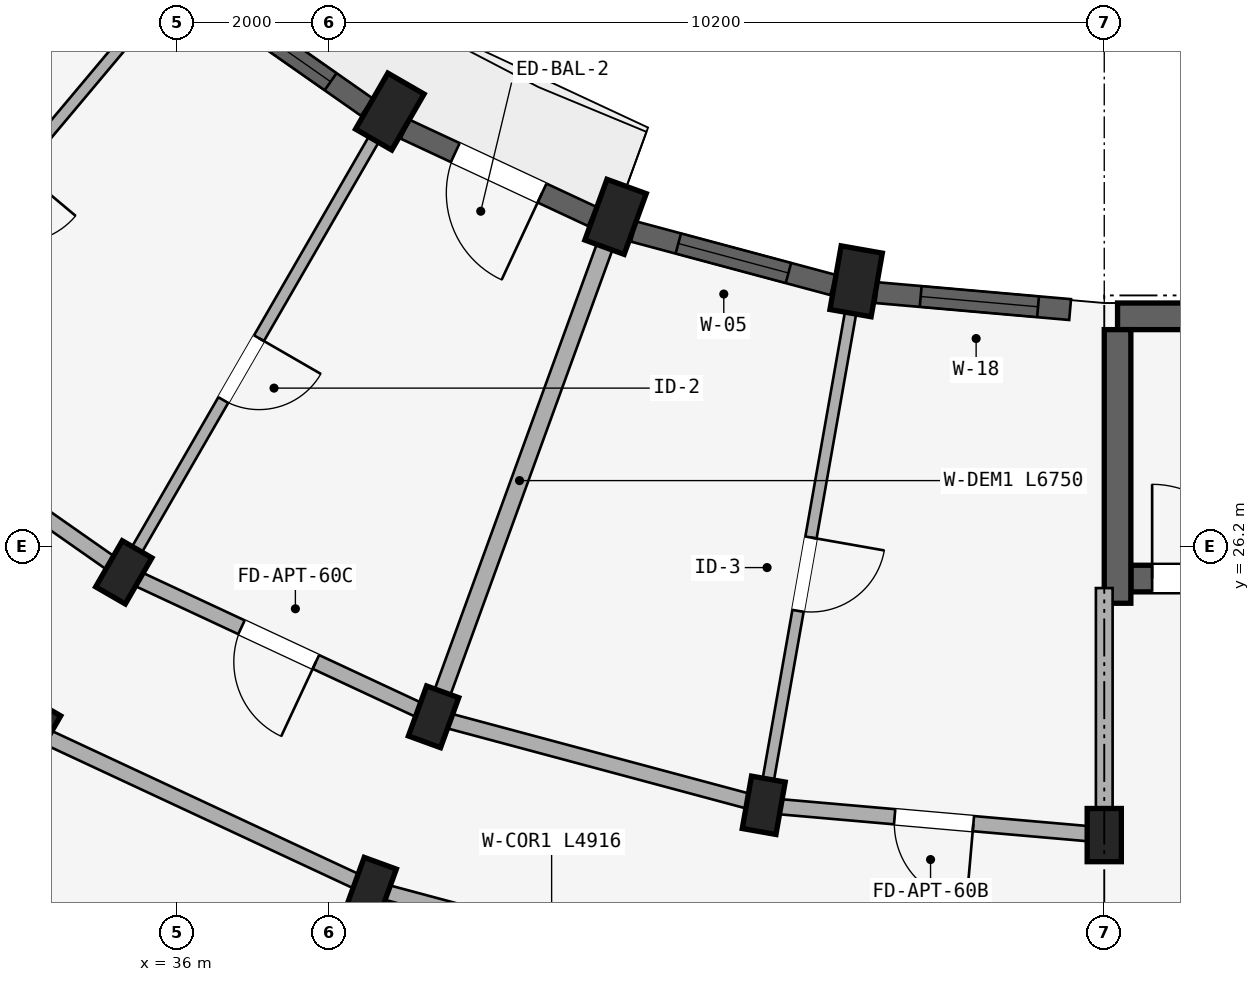
"""IFC4 building model, lengths in metres.
Left out: names, types, materials, properties, quantities, classifications, styles, units other than length and angle.
Written with IfcOpenShell. Run it as: python <this file> out.ifc"""

import sys

from ifc_helpers import new_model, si_unit, direction, frame, frame_2d, origin, origin_2d, place, context, subcontext, project, spatial, rectangle, extrude, element, fill, save


model = new_model("IFC4")
c1 = context("Model", 3, precision=1e-05, world=origin(), true_north=direction((0.0, 1.0)))
c2 = subcontext(c1, "Body", "Model", "MODEL_VIEW")
j1 = project(units=[si_unit("LENGTHUNIT", "METRE"), si_unit("PLANEANGLEUNIT", "RADIAN")], contexts=[c1])
p1 = place(None, origin())
s1 = spatial("IfcSite", under=j1, at=p1, CompositionType="ELEMENT")
p2 = place(p1, origin())
s2 = spatial("IfcBuilding", under=s1, at=p2, CompositionType="ELEMENT")
p3 = place(p2, frame((0.0, 0.0, 11.85)))
s3 = spatial("IfcBuildingStorey", under=s2, at=p3, CompositionType="ELEMENT", Elevation=11.85)
p4 = place(p3, frame((48.375, 29.225, 0.0), z_axis=(0.0, 0.0, 1.0), x_axis=(1.0, 0.0, 0.0)))
e1 = element("IfcWall", 1, at=p4, inside=s3, PredefinedType="SHEAR", context=c2, shape_type="SweptSolid", body=[
    extrude(rectangle(XDim=8.25, YDim=0.35, at=frame_2d((4.125, 0.0))), origin(), (0.0, 0.0, 1.0), 2.93),
])
p5 = place(p3, frame((48.55, 25.775, 0.0), z_axis=(0.0, 0.0, 1.0), x_axis=(1.0, 0.0, 0.0)))
e2 = element("IfcWall", 2, at=p5, inside=s3, PredefinedType="SHEAR", context=c2, shape_type="SweptSolid", body=[
    extrude(rectangle(XDim=7.9, YDim=0.35, at=frame_2d((3.95, 0.0))), origin(), (0.0, 0.0, 1.0), 2.93),
])
p6 = place(p5, frame((0.28, 0.0, 0.0)))
e3 = element("IfcOpeningElement", 3, at=p6, cuts=e2, PredefinedType="OPENING", context=c2, shape_type="SweptSolid", body=[
    extrude(rectangle(XDim=1.24, YDim=2.15, at=frame_2d((0.62, 1.075))), frame((0.0, 0.185, 0.0), z_axis=(0.0, -1.0, 0.0), x_axis=(1.0, 0.0, 0.0)), (0.0, 0.0, 1.0), 0.37),
])
p7 = place(p3, frame((48.375, 29.05, 0.0), z_axis=(0.0, 0.0, 1.0), x_axis=(0.0, -1.0, 0.0)))
e4 = element("IfcWall", 4, at=p7, inside=s3, PredefinedType="SHEAR", context=c2, shape_type="SweptSolid", body=[
    extrude(rectangle(XDim=3.6, YDim=0.35, at=frame_2d((1.8, 0.0))), origin(), (0.0, 0.0, 1.0), 2.93),
])
p8 = place(p3, frame((48.2, 22.4, 0.0), z_axis=(0.0, 0.0, 1.0), x_axis=(1.0, 0.0, 0.0)))
e5 = element("IfcColumn", 5, at=p8, inside=s3, PredefinedType="COLUMN", context=c2, shape_type="SweptSolid", body=[
    extrude(rectangle(XDim=0.45, YDim=0.7, at=origin_2d()), origin(), (0.0, 0.0, 1.0), 2.93),
])
p9 = place(p3, frame((44.935, 29.686, 0.0), z_axis=(0.0, 0.0, 1.0), x_axis=(-0.984807753012, 0.173648177667, 0.0)))
e6 = element("IfcColumn", 6, at=p9, inside=s3, PredefinedType="COLUMN", context=c2, shape_type="SweptSolid", body=[
    extrude(rectangle(XDim=0.55, YDim=0.85, at=origin_2d()), origin(), (0.0, 0.0, 1.0), 2.93),
])
p10 = place(p3, frame((43.72, 22.792, 0.0), z_axis=(0.0, 0.0, 1.0), x_axis=(-0.984807753012, 0.173648177667, 0.0)))
e7 = element("IfcColumn", 7, at=p10, inside=s3, PredefinedType="COLUMN", context=c2, shape_type="SweptSolid", body=[
    extrude(rectangle(XDim=0.45, YDim=0.7, at=origin_2d()), origin(), (0.0, 0.0, 1.0), 2.93),
])
p11 = place(p3, frame((41.77, 30.534, 0.0), z_axis=(0.0, 0.0, 1.0), x_axis=(-0.939692620786, 0.342020143326, 0.0)))
e8 = element("IfcColumn", 8, at=p11, inside=s3, PredefinedType="COLUMN", context=c2, shape_type="SweptSolid", body=[
    extrude(rectangle(XDim=0.55, YDim=0.85, at=origin_2d()), origin(), (0.0, 0.0, 1.0), 2.93),
])
for number, where, z_axis, x_axis in (
    (9, (39.376, 23.956, 0.0), (0.0, 0.0, 1.0), (-0.94, 0.342, 0.0)),
    (10, (38.555, 21.701, 0.0), (0.0, 0.0, 1.0), (-0.94, 0.342, 0.0)),
):
    element("IfcColumn", number, at=place(p3, frame(where, z_axis=z_axis, x_axis=x_axis)), inside=s3, PredefinedType="COLUMN", context=c2, shape_type="SweptSolid", body=[
        extrude(rectangle(XDim=0.45, YDim=0.7, at=origin_2d()), origin(), (0.0, 0.0, 1.0), 2.93),
    ])
p12 = place(p3, frame((38.8, 31.919, 0.0), z_axis=(0.0, 0.0, 1.0), x_axis=(-0.866025403784, 0.5, 0.0)))
e11 = element("IfcColumn", 11, at=p12, inside=s3, PredefinedType="COLUMN", context=c2, shape_type="SweptSolid", body=[
    extrude(rectangle(XDim=0.55, YDim=0.85, at=origin_2d()), origin(), (0.0, 0.0, 1.0), 2.93),
])
for number, where, z_axis, x_axis in (
    (12, (35.3, 25.856, 0.0), (0.0, 0.0, 1.0), (-0.866, 0.5, 0.0)),
    (13, (34.1, 23.778, 0.0), (0.0, 0.0, 1.0), (-0.866, 0.5, 0.0)),
):
    element("IfcColumn", number, at=place(p3, frame(where, z_axis=z_axis, x_axis=x_axis)), inside=s3, PredefinedType="COLUMN", context=c2, shape_type="SweptSolid", body=[
        extrude(rectangle(XDim=0.45, YDim=0.7, at=origin_2d()), origin(), (0.0, 0.0, 1.0), 2.93),
    ])
p13 = place(p3, frame((48.2, 22.4, 0.0), z_axis=(0.0, 0.0, 1.0), x_axis=(-0.996191949488, 0.087187153726, 0.0)))
e14 = element("IfcWall", 14, at=p13, inside=s3, PredefinedType="STANDARD", context=c2, shape_type="SweptSolid", body=[
    extrude(rectangle(XDim=4.497, YDim=0.2, at=frame_2d((2.249, 0.0))), origin(), (0.0, 0.0, 1.0), 2.372),
])
p14 = place(p13, frame((1.729, 0.0, 0.0)))
e15 = element("IfcOpeningElement", 15, at=p14, cuts=e14, PredefinedType="OPENING", context=c2, shape_type="SweptSolid", body=[
    extrude(rectangle(XDim=1.04, YDim=2.15, at=frame_2d((0.52, 1.075))), frame((0.0, 0.11, 0.0), z_axis=(0.0, -1.0, 0.0), x_axis=(1.0, 0.0, 0.0)), (0.0, 0.0, 1.0), 0.22),
])
p15 = place(p3, frame((43.72, 22.792, 0.0), z_axis=(0.0, 0.0, 1.0), x_axis=(-0.965934240054, 0.258787642463, 0.0)))
e16 = element("IfcWall", 16, at=p15, inside=s3, PredefinedType="STANDARD", context=c2, shape_type="SweptSolid", body=[
    extrude(rectangle(XDim=4.497, YDim=0.2, at=frame_2d((2.249, 0.0))), origin(), (0.0, 0.0, 1.0), 2.372),
])
p16 = place(p3, frame((43.303, 20.428, 0.0), z_axis=(0.0, 0.0, 1.0), x_axis=(-0.965930095386, 0.258803112091, 0.0)))
e17 = element("IfcWall", 17, at=p16, inside=s3, PredefinedType="STANDARD", context=c2, shape_type="SweptSolid", body=[
    extrude(rectangle(XDim=4.916, YDim=0.2, at=frame_2d((2.458, 0.0))), origin(), (0.0, 0.0, 1.0), 2.372),
])
p17 = place(p3, frame((39.376, 23.956, 0.0), z_axis=(0.0, 0.0, 1.0), x_axis=(-0.906307919131, 0.422617978463, 0.0)))
e18 = element("IfcWall", 18, at=p17, inside=s3, PredefinedType="STANDARD", context=c2, shape_type="SweptSolid", body=[
    extrude(rectangle(XDim=4.497, YDim=0.2, at=frame_2d((2.249, 0.0))), origin(), (0.0, 0.0, 1.0), 2.372),
])
p18 = place(p17, frame((1.709, 0.0, 0.0)))
e19 = element("IfcOpeningElement", 19, at=p18, cuts=e18, PredefinedType="OPENING", context=c2, shape_type="SweptSolid", body=[
    extrude(rectangle(XDim=1.08, YDim=2.15, at=frame_2d((0.54, 1.075))), frame((0.0, 0.11, 0.0), z_axis=(0.0, -1.0, 0.0), x_axis=(1.0, 0.0, 0.0)), (0.0, 0.0, 1.0), 0.22),
])
p19 = place(p3, frame((38.555, 21.701, 0.0), z_axis=(0.0, 0.0, 1.0), x_axis=(-0.906302381024, 0.422629854778, 0.0)))
e20 = element("IfcWall", 20, at=p19, inside=s3, PredefinedType="STANDARD", context=c2, shape_type="SweptSolid", body=[
    extrude(rectangle(XDim=4.915, YDim=0.2, at=frame_2d((2.458, 0.0))), origin(), (0.0, 0.0, 1.0), 2.372),
])
p20 = place(p3, frame((35.3, 25.856, 0.0), z_axis=(0.0, 0.0, 1.0), x_axis=(-0.819155404658, 0.573571637217, 0.0)))
e21 = element("IfcWall", 21, at=p20, inside=s3, PredefinedType="STANDARD", context=c2, shape_type="SweptSolid", body=[
    extrude(rectangle(XDim=4.497, YDim=0.2, at=frame_2d((2.249, 0.0))), origin(), (0.0, 0.0, 1.0), 2.372),
])
p21 = place(p3, frame((48.2, 25.65, 0.0), z_axis=(0.0, 0.0, 1.0), x_axis=(0.0, -1.0, 0.0)))
e22 = element("IfcWall", 22, at=p21, inside=s3, PredefinedType="STANDARD", context=c2, shape_type="SweptSolid", body=[
    extrude(rectangle(XDim=3.2, YDim=0.22, at=frame_2d((1.6, 0.0))), origin(), (0.0, 0.0, 1.0), 2.372),
])
p22 = place(p3, frame((44.901, 29.489, 0.0), z_axis=(0.0, 0.0, 1.0), x_axis=(-0.173647089161, -0.984807944945, 0.0)))
e23 = element("IfcWall", 23, at=p22, inside=s3, PredefinedType="PARTITIONING", context=c2, shape_type="SweptSolid", body=[
    extrude(rectangle(XDim=6.75, YDim=0.15, at=frame_2d((3.375, 0.0))), origin(), (0.0, 0.0, 1.0), 2.372),
])
p23 = place(p22, frame((3.222, 0.0, 0.0)))
e24 = element("IfcOpeningElement", 24, at=p23, cuts=e23, PredefinedType="OPENING", context=c2, shape_type="SweptSolid", body=[
    extrude(rectangle(XDim=0.98, YDim=2.12, at=frame_2d((0.49, 1.06))), frame((0.0, 0.085, 0.0), z_axis=(0.0, -1.0, 0.0), x_axis=(1.0, 0.0, 0.0)), (0.0, 0.0, 1.0), 0.17),
])
p24 = place(p3, frame((41.702, 30.346, 0.0), z_axis=(0.0, 0.0, 1.0), x_axis=(-0.342010221662, -0.939696231917, 0.0)))
e25 = element("IfcWall", 25, at=p24, inside=s3, PredefinedType="STANDARD", context=c2, shape_type="SweptSolid", body=[
    extrude(rectangle(XDim=6.75, YDim=0.22, at=frame_2d((3.375, 0.0))), origin(), (0.0, 0.0, 1.0), 2.372),
])
p25 = place(p3, frame((38.521, 21.607, 0.0), z_axis=(0.0, 0.0, 1.0), x_axis=(-0.342022120477, -0.939691901159, 0.0)))
e26 = element("IfcWall", 26, at=p25, inside=s3, PredefinedType="PARTITIONING", context=c2, shape_type="SweptSolid", body=[
    extrude(rectangle(XDim=17.42, YDim=0.15, at=frame_2d((8.71, 0.0))), origin(), (0.0, 0.0, 1.0), 2.372),
])
p26 = place(p25, frame((4.45, 0.0, 0.0)))
e27 = element("IfcOpeningElement", 27, at=p26, cuts=e26, PredefinedType="OPENING", context=c2, shape_type="SweptSolid", body=[
    extrude(rectangle(XDim=0.8, YDim=2.1, at=frame_2d((0.4, 1.05))), frame((0.0, 0.085, 0.0), z_axis=(0.0, -1.0, 0.0), x_axis=(1.0, 0.0, 0.0)), (0.0, 0.0, 1.0), 0.17),
])
p27 = place(p3, frame((38.7, 31.746, 0.0), z_axis=(0.0, 0.0, 1.0), x_axis=(-0.499997969693, -0.866026575979, 0.0)))
e28 = element("IfcWall", 28, at=p27, inside=s3, PredefinedType="PARTITIONING", context=c2, shape_type="SweptSolid", body=[
    extrude(rectangle(XDim=6.75, YDim=0.15, at=frame_2d((3.375, 0.0))), origin(), (0.0, 0.0, 1.0), 2.372),
])
p28 = place(p27, frame((3.242, 0.0, 0.0)))
e29 = element("IfcOpeningElement", 29, at=p28, cuts=e28, PredefinedType="OPENING", context=c2, shape_type="SweptSolid", body=[
    extrude(rectangle(XDim=0.94, YDim=2.1, at=frame_2d((0.47, 1.05))), frame((0.0, 0.085, 0.0), z_axis=(0.0, -1.0, 0.0), x_axis=(1.0, 0.0, 0.0)), (0.0, 0.0, 1.0), 0.17),
])
p29 = place(p3, frame((35.987, 33.645, 0.0), z_axis=(0.0, 0.0, 1.0), x_axis=(-0.642784846501, -0.766046761698, 0.0)))
e30 = element("IfcWall", 30, at=p29, inside=s3, PredefinedType="PARTITIONING", context=c2, shape_type="SweptSolid", body=[
    extrude(rectangle(XDim=6.75, YDim=0.15, at=frame_2d((3.375, 0.0))), origin(), (0.0, 0.0, 1.0), 2.372),
])
p30 = place(p29, frame((3.222, 0.0, 0.0)))
e31 = element("IfcOpeningElement", 31, at=p30, cuts=e30, PredefinedType="OPENING", context=c2, shape_type="SweptSolid", body=[
    extrude(rectangle(XDim=0.98, YDim=2.12, at=frame_2d((0.49, 1.06))), frame((0.0, 0.085, 0.0), z_axis=(0.0, -1.0, 0.0), x_axis=(1.0, 0.0, 0.0)), (0.0, 0.0, 1.0), 0.17),
])
p31 = place(p3, frame((47.751, 29.314, 0.0), z_axis=(0.0, 0.0, 1.0), x_axis=(-0.996194235595, 0.08716102895, 0.0)))
e32 = element("IfcWall", 32, at=p31, inside=s3, PredefinedType="STANDARD", context=c2, shape_type="SweptSolid", body=[
    extrude(rectangle(XDim=2.557, YDim=0.275, at=frame_2d((1.279, 0.0))), origin(), (0.0, 0.0, 1.0), 2.422),
])
p32 = place(p31, frame((0.424, 0.0, 0.622)))
e33 = element("IfcOpeningElement", 33, at=p32, cuts=e32, PredefinedType="OPENING", context=c2, shape_type="SweptSolid", body=[
    extrude(rectangle(XDim=1.55, YDim=1.6, at=frame_2d((0.775, 0.8))), frame((0.0, 0.147, 0.0), z_axis=(0.0, -1.0, 0.0), x_axis=(1.0, 0.0, 0.0)), (0.0, 0.0, 1.0), 0.295),
])
p33 = place(p3, frame((44.633, 29.637, 0.0), z_axis=(0.0, 0.0, 1.0), x_axis=(-0.965925595341, 0.258819907011, 0.0)))
e34 = element("IfcWall", 34, at=p33, inside=s3, PredefinedType="STANDARD", context=c2, shape_type="SweptSolid", body=[
    extrude(rectangle(XDim=2.718, YDim=0.275, at=frame_2d((1.359, 0.0))), origin(), (0.0, 0.0, 1.0), 2.422),
])
p34 = place(p33, frame((0.609, 0.0, 0.572)))
e35 = element("IfcOpeningElement", 35, at=p34, cuts=e34, PredefinedType="OPENING", context=c2, shape_type="SweptSolid", body=[
    extrude(rectangle(XDim=1.5, YDim=1.65, at=frame_2d((0.75, 0.825))), frame((0.0, 0.147, 0.0), z_axis=(0.0, -1.0, 0.0), x_axis=(1.0, 0.0, 0.0)), (0.0, 0.0, 1.0), 0.295),
])
p35 = place(p3, frame((41.464, 30.539, 0.0), z_axis=(0.0, 0.0, 1.0), x_axis=(-0.906311629168, 0.422610022166, 0.0)))
e36 = element("IfcWall", 36, at=p35, inside=s3, PredefinedType="STANDARD", context=c2, shape_type="SweptSolid", body=[
    extrude(rectangle(XDim=2.718, YDim=0.275, at=frame_2d((1.359, 0.0))), origin(), (0.0, 0.0, 1.0), 2.422),
])
p36 = place(p35, frame((0.729, 0.0, 0.0)))
e37 = element("IfcOpeningElement", 37, at=p36, cuts=e36, PredefinedType="OPENING", context=c2, shape_type="SweptSolid", body=[
    extrude(rectangle(XDim=1.26, YDim=2.15, at=frame_2d((0.63, 1.075))), frame((0.0, 0.147, 0.0), z_axis=(0.0, -1.0, 0.0), x_axis=(1.0, 0.0, 0.0)), (0.0, 0.0, 1.0), 0.295),
])
p37 = place(p3, frame((38.499, 31.977, 0.0), z_axis=(0.0, 0.0, 1.0), x_axis=(-0.81917282593, 0.573546755948, 0.0)))
e38 = element("IfcWall", 38, at=p37, inside=s3, PredefinedType="STANDARD", context=c2, shape_type="SweptSolid", body=[
    extrude(rectangle(XDim=2.718, YDim=0.275, at=frame_2d((1.359, 0.0))), origin(), (0.0, 0.0, 1.0), 2.422),
])
p38 = place(p37, frame((0.584, 0.0, 0.622)))
e39 = element("IfcOpeningElement", 39, at=p38, cuts=e38, PredefinedType="OPENING", context=c2, shape_type="SweptSolid", body=[
    extrude(rectangle(XDim=1.55, YDim=1.6, at=frame_2d((0.775, 0.8))), frame((0.0, 0.147, 0.0), z_axis=(0.0, -1.0, 0.0), x_axis=(1.0, 0.0, 0.0)), (0.0, 0.0, 1.0), 0.295),
])
p39 = place(p32, origin())
e40 = element("IfcWindow", 40, at=p39, inside=s3, PartitioningType="DOUBLE_PANEL_VERTICAL", PredefinedType="WINDOW", context=c2, shape_type="SweptSolid", body=[
    extrude(rectangle(XDim=1.55, YDim=1.6, at=frame_2d((0.775, 0.8))), frame((0.0, 0.03, 0.0), z_axis=(0.0, -1.0, 0.0), x_axis=(1.0, 0.0, 0.0)), (0.0, 0.0, 1.0), 0.06),
])
fill(e33, e40)
p40 = place(p34, origin())
e41 = element("IfcWindow", 41, at=p40, inside=s3, PartitioningType="DOUBLE_PANEL_VERTICAL", PredefinedType="WINDOW", context=c2, shape_type="SweptSolid", body=[
    extrude(rectangle(XDim=1.5, YDim=1.65, at=frame_2d((0.75, 0.825))), frame((0.0, 0.03, 0.0), z_axis=(0.0, -1.0, 0.0), x_axis=(1.0, 0.0, 0.0)), (0.0, 0.0, 1.0), 0.06),
])
fill(e35, e41)
p41 = place(p38, origin())
e42 = element("IfcWindow", 42, at=p41, inside=s3, PartitioningType="DOUBLE_PANEL_VERTICAL", PredefinedType="WINDOW", context=c2, shape_type="SweptSolid", body=[
    extrude(rectangle(XDim=1.55, YDim=1.6, at=frame_2d((0.775, 0.8))), frame((0.0, 0.03, 0.0), z_axis=(0.0, -1.0, 0.0), x_axis=(1.0, 0.0, 0.0)), (0.0, 0.0, 1.0), 0.06),
])
fill(e39, e42)
p42 = place(p6, origin())
e43 = element("IfcDoor", 43, at=p42, inside=s3, OperationType="SINGLE_SWING_LEFT", PredefinedType="DOOR", context=c2, shape_type="SweptSolid", body=[
    extrude(rectangle(XDim=1.24, YDim=2.15, at=frame_2d((0.62, 1.075))), frame((0.0, 0.025, 0.0), z_axis=(0.0, -1.0, 0.0), x_axis=(1.0, 0.0, 0.0)), (0.0, 0.0, 1.0), 0.05),
])
fill(e3, e43)
p43 = place(p23, origin())
e44 = element("IfcDoor", 44, at=p43, inside=s3, OperationType="SINGLE_SWING_LEFT", PredefinedType="DOOR", context=c2, shape_type="SweptSolid", body=[
    extrude(rectangle(XDim=0.98, YDim=2.12, at=frame_2d((0.49, 1.06))), frame((0.0, 0.025, 0.0), z_axis=(0.0, -1.0, 0.0), x_axis=(1.0, 0.0, 0.0)), (0.0, 0.0, 1.0), 0.05),
])
fill(e24, e44)
p44 = place(p28, frame((0.94, 0.0, 0.0), z_axis=(0.0, 0.0, 1.0), x_axis=(-1.0, 0.0, 0.0)))
e45 = element("IfcDoor", 45, at=p44, inside=s3, OperationType="SINGLE_SWING_RIGHT", PredefinedType="DOOR", context=c2, shape_type="SweptSolid", body=[
    extrude(rectangle(XDim=0.94, YDim=2.1, at=frame_2d((0.47, 1.05))), frame((0.0, 0.025, 0.0), z_axis=(0.0, -1.0, 0.0), x_axis=(1.0, 0.0, 0.0)), (0.0, 0.0, 1.0), 0.05),
])
fill(e29, e45)
p45 = place(p14, frame((1.04, 0.0, 0.0), z_axis=(0.0, 0.0, 1.0), x_axis=(-1.0, 0.0, 0.0)))
e46 = element("IfcDoor", 46, at=p45, inside=s3, OperationType="SINGLE_SWING_RIGHT", PredefinedType="DOOR", context=c2, shape_type="SweptSolid", body=[
    extrude(rectangle(XDim=1.04, YDim=2.15, at=frame_2d((0.52, 1.075))), frame((0.0, 0.025, 0.0), z_axis=(0.0, -1.0, 0.0), x_axis=(1.0, 0.0, 0.0)), (0.0, 0.0, 1.0), 0.05),
])
fill(e15, e46)
p46 = place(p18, origin())
e47 = element("IfcDoor", 47, at=p46, inside=s3, OperationType="SINGLE_SWING_LEFT", PredefinedType="DOOR", context=c2, shape_type="SweptSolid", body=[
    extrude(rectangle(XDim=1.08, YDim=2.15, at=frame_2d((0.54, 1.075))), frame((0.0, 0.025, 0.0), z_axis=(0.0, -1.0, 0.0), x_axis=(1.0, 0.0, 0.0)), (0.0, 0.0, 1.0), 0.05),
])
fill(e19, e47)
p47 = place(p36, frame((1.26, 0.0, 0.0), z_axis=(0.0, 0.0, 1.0), x_axis=(-1.0, 0.0, 0.0)))
e48 = element("IfcDoor", 48, at=p47, inside=s3, OperationType="SINGLE_SWING_RIGHT", PredefinedType="DOOR", context=c2, shape_type="SweptSolid", body=[
    extrude(rectangle(XDim=1.26, YDim=2.15, at=frame_2d((0.63, 1.075))), frame((0.0, 0.025, 0.0), z_axis=(0.0, -1.0, 0.0), x_axis=(1.0, 0.0, 0.0)), (0.0, 0.0, 1.0), 0.05),
])
fill(e37, e48)
save(model, sys.argv[1])
